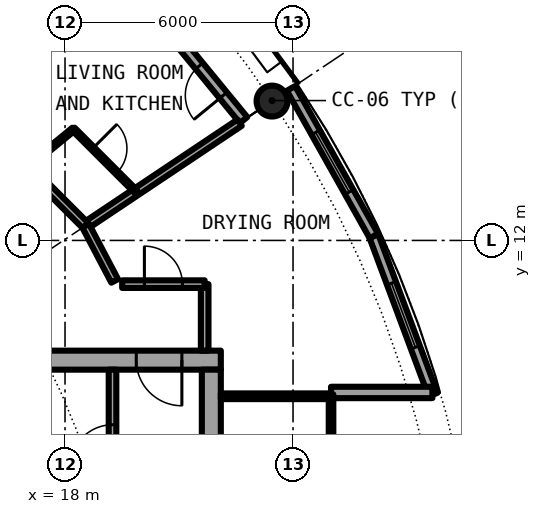
"""IFC4 building model, lengths in metres.
Left out: names, types, materials, properties, quantities, classifications, styles, units other than length and angle.
Written with IfcOpenShell. Run it as: python <this file> out.ifc"""

import sys

from ifc_helpers import new_model, si_unit, direction, frame, frame_2d, origin, origin_2d, place, context, subcontext, project, spatial, rectangle, hollow_circle, extrude, element, fill, save


model = new_model("IFC4")
c1 = context("Model", 3, precision=1e-05, world=origin(), true_north=direction((0.0, 1.0)))
c2 = subcontext(c1, "Body", "Model", "MODEL_VIEW")
j1 = project(units=[si_unit("LENGTHUNIT", "METRE"), si_unit("PLANEANGLEUNIT", "RADIAN")], contexts=[c1])
p1 = place(None, origin())
s1 = spatial("IfcSite", under=j1, at=p1, CompositionType="ELEMENT")
p2 = place(p1, origin())
s2 = spatial("IfcBuilding", under=s1, at=p2, CompositionType="ELEMENT")
p3 = place(p2, frame((0.0, 0.0, 173.8)))
s3 = spatial("IfcBuildingStorey", under=s2, at=p3, CompositionType="ELEMENT", Elevation=173.8)
p4 = place(p3, frame((23.448, 15.667, 0.0), z_axis=(0.0, 0.0, 1.0), x_axis=(1.0, 0.0, 0.0)))
e1 = element("IfcColumn", 1, at=p4, inside=s3, PredefinedType="COLUMN", context=c2, shape_type="SweptSolid", body=[
    extrude(hollow_circle(Radius=0.406, WallThickness=0.04, at=origin_2d()), origin(), (0.0, 0.0, 1.0), 3.05),
])
p5 = place(p3, frame((22.699, 15.167, 0.0), z_axis=(0.0, 0.0, 1.0), x_axis=(-0.634382322723, 0.773019449054, 0.0)))
e2 = element("IfcWall", 2, at=p5, inside=s3, PredefinedType="SOLIDWALL", context=c2, shape_type="SweptSolid", body=[
    extrude(rectangle(XDim=5.352, YDim=0.25, at=frame_2d((2.676, 0.0))), origin(), (0.0, 0.0, 1.0), 2.7),
])
p6 = place(p5, frame((0.841, 0.0, 0.0)))
e3 = element("IfcOpeningElement", 3, at=p6, cuts=e2, PredefinedType="OPENING", context=c2, shape_type="SweptSolid", body=[
    extrude(rectangle(XDim=1.0, YDim=2.2, at=frame_2d((0.5, 1.1))), frame((0.0, 0.135, 0.0), z_axis=(0.0, -1.0, 0.0), x_axis=(1.0, 0.0, 0.0)), (0.0, 0.0, 1.0), 0.27),
])
p7 = place(p5, frame((3.111, 0.0, 0.3)))
e4 = element("IfcOpeningElement", 4, at=p7, cuts=e2, PredefinedType="OPENING", context=c2, shape_type="SweptSolid", body=[
    extrude(rectangle(XDim=1.8, YDim=2.1, at=frame_2d((0.9, 1.05))), frame((0.0, 0.135, 0.0), z_axis=(0.0, -1.0, 0.0), x_axis=(1.0, 0.0, 0.0)), (0.0, 0.0, 1.0), 0.27),
])
p8 = place(p3, frame((27.682, 7.945, 0.0), z_axis=(0.0, 0.0, 1.0), x_axis=(-0.349247811493, 0.937030397675, 0.0)))
e5 = element("IfcWall", 5, at=p8, inside=s3, PredefinedType="SOLIDWALL", context=c2, shape_type="SweptSolid", body=[
    extrude(rectangle(XDim=4.452, YDim=0.25, at=frame_2d((2.226, 0.0))), origin(), (0.0, 0.0, 1.0), 2.7),
])
p9 = place(p8, frame((1.327, 0.0, 0.3)))
e6 = element("IfcOpeningElement", 6, at=p9, cuts=e5, PredefinedType="OPENING", context=c2, shape_type="SweptSolid", body=[
    extrude(rectangle(XDim=1.8, YDim=2.1, at=frame_2d((0.9, 1.05))), frame((0.0, 0.135, 0.0), z_axis=(0.0, -1.0, 0.0), x_axis=(1.0, 0.0, 0.0)), (0.0, 0.0, 1.0), 0.27),
])
p10 = place(p3, frame((26.127, 12.117, 0.0), z_axis=(0.0, 0.0, 1.0), x_axis=(-0.489696356642, 0.871893042919, 0.0)))
e7 = element("IfcWall", 7, at=p10, inside=s3, PredefinedType="SOLIDWALL", context=c2, shape_type="SweptSolid", body=[
    extrude(rectangle(XDim=4.454, YDim=0.25, at=frame_2d((2.227, 0.0))), origin(), (0.0, 0.0, 1.0), 2.7),
])
p11 = place(p10, frame((1.327, 0.0, 0.3)))
e8 = element("IfcOpeningElement", 8, at=p11, cuts=e7, PredefinedType="OPENING", context=c2, shape_type="SweptSolid", body=[
    extrude(rectangle(XDim=1.8, YDim=2.1, at=frame_2d((0.9, 1.05))), frame((0.0, 0.135, 0.0), z_axis=(0.0, -1.0, 0.0), x_axis=(1.0, 0.0, 0.0)), (0.0, 0.0, 1.0), 0.27),
])
p12 = place(p3, frame((25.0, 8.0, 0.0), z_axis=(0.0, 0.0, 1.0), x_axis=(1.0, 0.0, 0.0)))
e9 = element("IfcWall", 9, at=p12, inside=s3, PredefinedType="SOLIDWALL", context=c2, shape_type="SweptSolid", body=[
    extrude(rectangle(XDim=2.667, YDim=0.3, at=frame_2d((1.333, 0.0))), origin(), (0.0, 0.0, 1.0), 2.7),
])
p13 = place(p3, frame((22.1, 8.85, 0.0), z_axis=(0.0, 0.0, 1.0), x_axis=(-1.0, 0.0, 0.0)))
e10 = element("IfcWall", 10, at=p13, inside=s3, PredefinedType="SHEAR", context=c2, shape_type="SweptSolid", body=[
    extrude(rectangle(XDim=13.6, YDim=0.5, at=frame_2d((6.8, 0.0))), origin(), (0.0, 0.0, 1.0), 3.05),
])
p14 = place(p13, frame((1.025, 0.0, 0.0)))
e11 = element("IfcOpeningElement", 11, at=p14, cuts=e10, PredefinedType="OPENING", context=c2, shape_type="SweptSolid", body=[
    extrude(rectangle(XDim=1.2, YDim=2.3, at=frame_2d((0.6, 1.15))), frame((0.0, 0.26, 0.0), z_axis=(0.0, -1.0, 0.0), x_axis=(1.0, 0.0, 0.0)), (0.0, 0.0, 1.0), 0.52),
])
p15 = place(p3, frame((21.85, 8.6, 0.0), z_axis=(0.0, 0.0, 1.0), x_axis=(0.0, -1.0, 0.0)))
e12 = element("IfcWall", 12, at=p15, inside=s3, PredefinedType="SHEAR", context=c2, shape_type="SweptSolid", body=[
    extrude(rectangle(XDim=17.2, YDim=0.5, at=frame_2d((8.6, 0.0))), origin(), (0.0, 0.0, 1.0), 3.05),
])
p16 = place(p15, frame((7.7, 0.0, 0.0)))
e13 = element("IfcOpeningElement", 13, at=p16, cuts=e12, PredefinedType="OPENING", context=c2, shape_type="SweptSolid", body=[
    extrude(rectangle(XDim=1.8, YDim=2.3, at=frame_2d((0.9, 1.15))), frame((0.0, 0.26, 0.0), z_axis=(0.0, -1.0, 0.0), x_axis=(1.0, 0.0, 0.0)), (0.0, 0.0, 1.0), 0.52),
])
p17 = place(p3, frame((19.25, 1.575, 0.0), z_axis=(0.0, 0.0, 1.0), x_axis=(0.0, 1.0, 0.0)))
e14 = element("IfcWall", 14, at=p17, inside=s3, PredefinedType="SOLIDWALL", context=c2, shape_type="SweptSolid", body=[
    extrude(rectangle(XDim=7.025, YDim=0.2, at=frame_2d((3.513, 0.0))), origin(), (0.0, 0.0, 1.0), 2.7),
])
p18 = place(p17, frame((4.475, 0.0, 0.0)))
e15 = element("IfcOpeningElement", 15, at=p18, cuts=e14, PredefinedType="OPENING", context=c2, shape_type="SweptSolid", body=[
    extrude(rectangle(XDim=1.1, YDim=2.3, at=frame_2d((0.55, 1.15))), frame((0.0, 0.11, 0.0), z_axis=(0.0, -1.0, 0.0), x_axis=(1.0, 0.0, 0.0)), (0.0, 0.0, 1.0), 0.22),
])
p19 = place(p3, frame((22.1, 7.9, 0.0), z_axis=(0.0, 0.0, 1.0), x_axis=(1.0, 0.0, 0.0)))
e16 = element("IfcWall", 16, at=p19, inside=s3, PredefinedType="PARTITIONING", context=c2, shape_type="SweptSolid", body=[
    extrude(rectangle(XDim=2.84, YDim=0.15, at=frame_2d((1.42, 0.0))), origin(), (0.0, 0.0, 1.0), 2.7),
])
p20 = place(p3, frame((25.0, -7.95, 0.0), z_axis=(0.0, 0.0, 1.0), x_axis=(0.0, 1.0, 0.0)))
e17 = element("IfcWall", 17, at=p20, inside=s3, PredefinedType="PARTITIONING", context=c2, shape_type="SweptSolid", body=[
    extrude(rectangle(XDim=15.9, YDim=0.12, at=frame_2d((7.95, 0.0))), origin(), (0.0, 0.0, 1.0), 2.7),
])
p21 = place(p20, frame((0.95, 0.0, 0.1)))
e18 = element("IfcOpeningElement", 18, at=p21, cuts=e17, PredefinedType="OPENING", context=c2, shape_type="SweptSolid", body=[
    extrude(rectangle(XDim=14.0, YDim=2.35, at=frame_2d((7.0, 1.175))), frame((0.0, 0.07, 0.0), z_axis=(0.0, -1.0, 0.0), x_axis=(1.0, 0.0, 0.0)), (0.0, 0.0, 1.0), 0.14),
])
p22 = place(p3, frame((21.675, 9.1, 0.0), z_axis=(0.0, 0.0, 1.0), x_axis=(0.0, 1.0, 0.0)))
e19 = element("IfcWall", 19, at=p22, inside=s3, PredefinedType="PARTITIONING", context=c2, shape_type="SweptSolid", body=[
    extrude(rectangle(XDim=1.75, YDim=0.2, at=frame_2d((0.875, 0.0))), origin(), (0.0, 0.0, 1.0), 2.7),
])
p23 = place(p3, frame((17.004, 13.927, 0.0), z_axis=(0.0, 0.0, 1.0), x_axis=(0.773446828454, 0.633861186344, 0.0)))
e20 = element("IfcWall", 20, at=p23, inside=s3, PredefinedType="PARTITIONING", context=c2, shape_type="SweptSolid", body=[
    extrude(rectangle(XDim=1.578, YDim=0.1, at=frame_2d((0.789, 0.0))), origin(), (0.0, 0.0, 1.0), 2.7),
])
p24 = place(p3, frame((16.575, 16.575, 0.0), z_axis=(0.0, 0.0, 1.0), x_axis=(0.707106781187, 0.707106781187, 0.0)))
e21 = element("IfcWall", 21, at=p24, inside=s3, PredefinedType="PARTITIONING", context=c2, shape_type="SweptSolid", body=[
    extrude(rectangle(XDim=3.735, YDim=0.1, at=frame_2d((1.868, 0.0))), origin(), (0.0, 0.0, 1.0), 2.7),
])
p25 = place(p24, frame((1.417, 0.0, 0.0)))
e22 = element("IfcOpeningElement", 22, at=p25, cuts=e21, PredefinedType="OPENING", context=c2, shape_type="SweptSolid", body=[
    extrude(rectangle(XDim=0.9, YDim=2.3, at=frame_2d((0.45, 1.15))), frame((0.0, 0.06, 0.0), z_axis=(0.0, -1.0, 0.0), x_axis=(1.0, 0.0, 0.0)), (0.0, 0.0, 1.0), 0.12),
])
p26 = place(p3, frame((18.542, 12.389, 0.0), z_axis=(0.0, 0.0, 1.0), x_axis=(0.831387096605, 0.55569370664, 0.0)))
e23 = element("IfcWall", 23, at=p26, inside=s3, PredefinedType="PARTITIONING", context=c2, shape_type="SweptSolid", body=[
    extrude(rectangle(XDim=4.875, YDim=0.2, at=frame_2d((2.438, 0.0))), origin(), (0.0, 0.0, 1.0), 2.7),
])
p27 = place(p3, frame((19.504, 10.85, 0.0), z_axis=(0.0, 0.0, 1.0), x_axis=(1.0, 0.0, 0.0)))
e24 = element("IfcWall", 24, at=p27, inside=s3, PredefinedType="PARTITIONING", context=c2, shape_type="SweptSolid", body=[
    extrude(rectangle(XDim=2.171, YDim=0.2, at=frame_2d((1.085, 0.0))), origin(), (0.0, 0.0, 1.0), 2.7),
])
p28 = place(p27, frame((0.585, 0.0, 0.0)))
e25 = element("IfcOpeningElement", 25, at=p28, cuts=e24, PredefinedType="OPENING", context=c2, shape_type="SweptSolid", body=[
    extrude(rectangle(XDim=1.0, YDim=2.3, at=frame_2d((0.5, 1.15))), frame((0.0, 0.11, 0.0), z_axis=(0.0, -1.0, 0.0), x_axis=(1.0, 0.0, 0.0)), (0.0, 0.0, 1.0), 0.22),
])
p29 = place(p3, frame((12.389, 18.542, 0.0), z_axis=(0.0, 0.0, 1.0), x_axis=(0.707106781187, -0.707106781187, 0.0)))
e26 = element("IfcWall", 26, at=p29, inside=s3, PredefinedType="PARTITIONING", context=c2, shape_type="SweptSolid", body=[
    extrude(rectangle(XDim=8.702, YDim=0.2, at=frame_2d((4.351, 0.0))), origin(), (0.0, 0.0, 1.0), 2.7),
])
p30 = place(p29, frame((2.763, 0.0, 0.0)))
e27 = element("IfcOpeningElement", 27, at=p30, cuts=e26, PredefinedType="OPENING", context=c2, shape_type="SweptSolid", body=[
    extrude(rectangle(XDim=1.0, YDim=2.3, at=frame_2d((0.5, 1.15))), frame((0.0, 0.11, 0.0), z_axis=(0.0, -1.0, 0.0), x_axis=(1.0, 0.0, 0.0)), (0.0, 0.0, 1.0), 0.22),
])
p31 = place(p3, frame((18.542, 12.389, 0.0), z_axis=(0.0, 0.0, 1.0), x_axis=(0.465605550524, -0.884992356646, 0.0)))
e28 = element("IfcWall", 28, at=p31, inside=s3, PredefinedType="PARTITIONING", context=c2, shape_type="SweptSolid", body=[
    extrude(rectangle(XDim=1.643, YDim=0.2, at=frame_2d((0.821, 0.0))), origin(), (0.0, 0.0, 1.0), 2.7),
])
p32 = place(p3, frame((18.218, 14.932, 0.0), z_axis=(0.0, 0.0, 1.0), x_axis=(0.707106781187, -0.707106781187, 0.0)))
e29 = element("IfcWall", 29, at=p32, inside=s3, PredefinedType="PARTITIONING", context=c2, shape_type="SweptSolid", body=[
    extrude(rectangle(XDim=2.332, YDim=0.1, at=frame_2d((1.166, 0.0))), origin(), (0.0, 0.0, 1.0), 2.7),
])
p33 = place(p32, frame((0.723, 0.0, 0.0)))
e30 = element("IfcOpeningElement", 30, at=p33, cuts=e29, PredefinedType="OPENING", context=c2, shape_type="SweptSolid", body=[
    extrude(rectangle(XDim=0.9, YDim=2.3, at=frame_2d((0.45, 1.15))), frame((0.0, 0.06, 0.0), z_axis=(0.0, -1.0, 0.0), x_axis=(1.0, 0.0, 0.0)), (0.0, 0.0, 1.0), 0.12),
])
p34 = place(p6, origin())
e31 = element("IfcDoor", 31, at=p34, inside=s3, OperationType="SINGLE_SWING_LEFT", PredefinedType="DOOR", context=c2, shape_type="SweptSolid", body=[
    extrude(rectangle(XDim=1.0, YDim=2.2, at=frame_2d((0.5, 1.1))), frame((0.0, 0.025, 0.0), z_axis=(0.0, -1.0, 0.0), x_axis=(1.0, 0.0, 0.0)), (0.0, 0.0, 1.0), 0.05),
])
fill(e3, e31)
p35 = place(p9, origin())
e32 = element("IfcWindow", 32, at=p35, inside=s3, PartitioningType="SINGLE_PANEL", PredefinedType="WINDOW", context=c2, shape_type="SweptSolid", body=[
    extrude(rectangle(XDim=1.8, YDim=2.1, at=frame_2d((0.9, 1.05))), frame((0.0, 0.03, 0.0), z_axis=(0.0, -1.0, 0.0), x_axis=(1.0, 0.0, 0.0)), (0.0, 0.0, 1.0), 0.06),
])
fill(e6, e32)
p36 = place(p11, origin())
e33 = element("IfcWindow", 33, at=p36, inside=s3, PartitioningType="SINGLE_PANEL", PredefinedType="WINDOW", context=c2, shape_type="SweptSolid", body=[
    extrude(rectangle(XDim=1.8, YDim=2.1, at=frame_2d((0.9, 1.05))), frame((0.0, 0.03, 0.0), z_axis=(0.0, -1.0, 0.0), x_axis=(1.0, 0.0, 0.0)), (0.0, 0.0, 1.0), 0.06),
])
fill(e8, e33)
p37 = place(p18, origin())
e34 = element("IfcDoor", 34, at=p37, inside=s3, OperationType="SINGLE_SWING_LEFT", PredefinedType="DOOR", context=c2, shape_type="SweptSolid", body=[
    extrude(rectangle(XDim=1.1, YDim=2.3, at=frame_2d((0.55, 1.15))), frame((0.0, 0.025, 0.0), z_axis=(0.0, -1.0, 0.0), x_axis=(1.0, 0.0, 0.0)), (0.0, 0.0, 1.0), 0.05),
])
fill(e15, e34)
p38 = place(p14, origin())
e35 = element("IfcDoor", 35, at=p38, inside=s3, OperationType="SINGLE_SWING_RIGHT", PredefinedType="DOOR", context=c2, shape_type="SweptSolid", body=[
    extrude(rectangle(XDim=1.2, YDim=2.3, at=frame_2d((0.6, 1.15))), frame((0.0, 0.025, 0.0), z_axis=(0.0, -1.0, 0.0), x_axis=(1.0, 0.0, 0.0)), (0.0, 0.0, 1.0), 0.05),
])
fill(e11, e35)
p39 = place(p21, origin())
e36 = element("IfcWindow", 36, at=p39, inside=s3, PartitioningType="SINGLE_PANEL", PredefinedType="WINDOW", context=c2, shape_type="SweptSolid", body=[
    extrude(rectangle(XDim=14.0, YDim=2.35, at=frame_2d((7.0, 1.175))), frame((0.0, 0.03, 0.0), z_axis=(0.0, -1.0, 0.0), x_axis=(1.0, 0.0, 0.0)), (0.0, 0.0, 1.0), 0.06),
])
fill(e18, e36)
p40 = place(p33, origin())
e37 = element("IfcDoor", 37, at=p40, inside=s3, OperationType="SINGLE_SWING_RIGHT", PredefinedType="DOOR", context=c2, shape_type="SweptSolid", body=[
    extrude(rectangle(XDim=0.9, YDim=2.3, at=frame_2d((0.45, 1.15))), frame((0.0, 0.025, 0.0), z_axis=(0.0, -1.0, 0.0), x_axis=(1.0, 0.0, 0.0)), (0.0, 0.0, 1.0), 0.05),
])
fill(e30, e37)
p41 = place(p28, origin())
e38 = element("IfcDoor", 38, at=p41, inside=s3, OperationType="SINGLE_SWING_LEFT", PredefinedType="DOOR", context=c2, shape_type="SweptSolid", body=[
    extrude(rectangle(XDim=1.0, YDim=2.3, at=frame_2d((0.5, 1.15))), frame((0.0, 0.025, 0.0), z_axis=(0.0, -1.0, 0.0), x_axis=(1.0, 0.0, 0.0)), (0.0, 0.0, 1.0), 0.05),
])
fill(e25, e38)
save(model, sys.argv[1])
